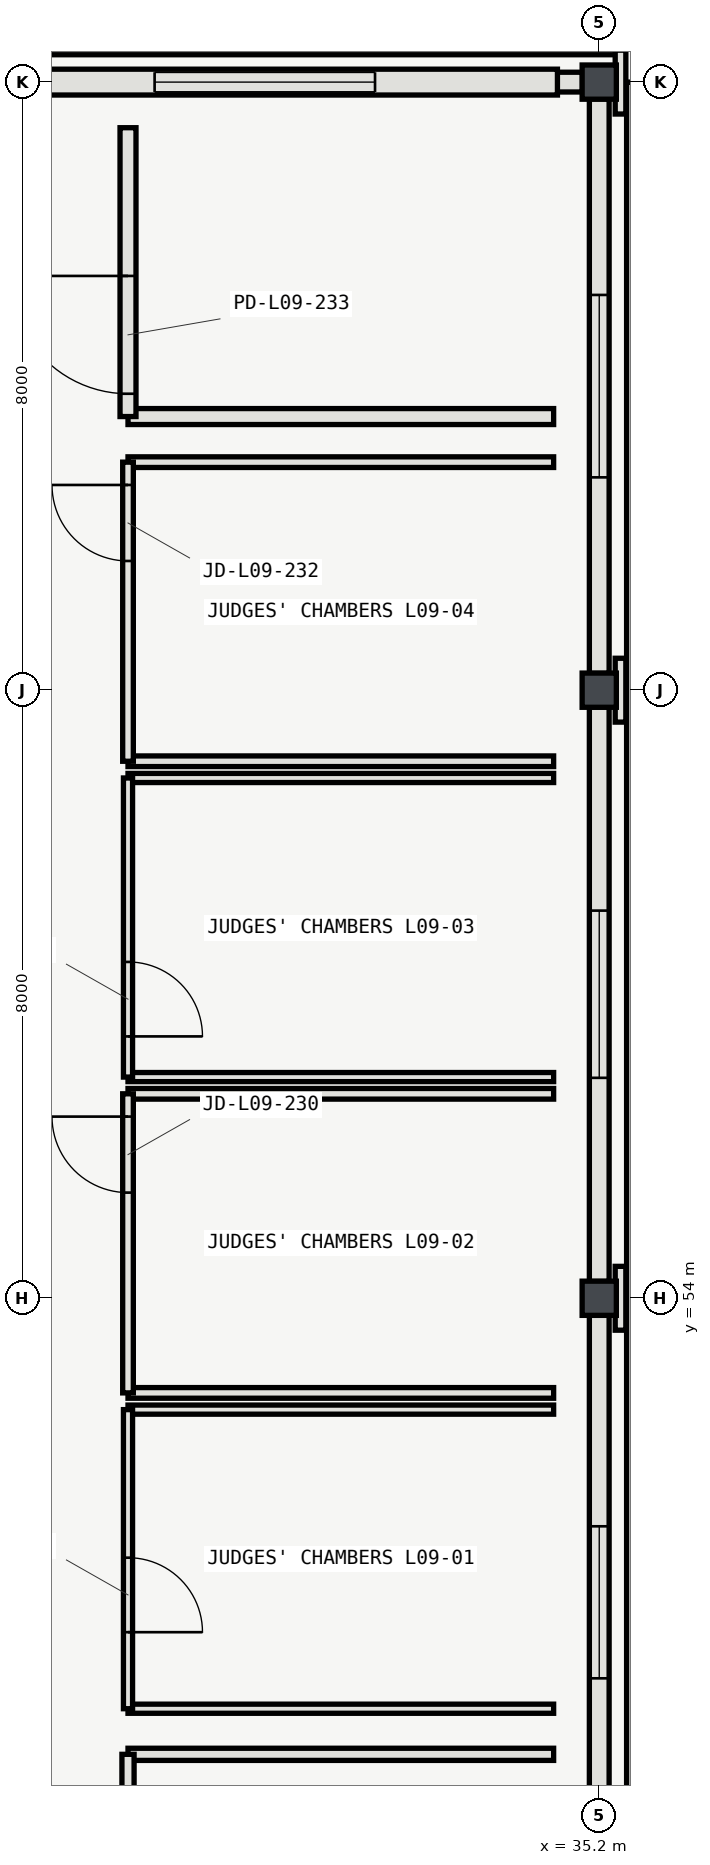
"""IFC4 building model, lengths in metres.
Left out: names, types, materials, properties, quantities, classifications, styles, units other than length and angle.
Written with IfcOpenShell. Run it as: python <this file> out.ifc"""

import sys

from ifc_helpers import new_model, si_unit, direction, frame, frame_2d, origin, origin_2d, place, context, subcontext, project, spatial, polyline, rectangle, hollow_rectangle, outline, extrude, element, fill, save


model = new_model("IFC4")
c1 = context("Model", 3, precision=1e-05, world=origin(), true_north=direction((0.0, 1.0)))
c2 = subcontext(c1, "Body", "Model", "MODEL_VIEW")
j1 = project(units=[si_unit("LENGTHUNIT", "METRE"), si_unit("PLANEANGLEUNIT", "RADIAN")], contexts=[c1])
p1 = place(None, origin())
s1 = spatial("IfcSite", under=j1, at=p1, CompositionType="ELEMENT")
p2 = place(p1, origin())
s2 = spatial("IfcBuilding", under=s1, at=p2, CompositionType="ELEMENT")
p3 = place(p2, frame((0.0, 0.0, 41.4)))
s3 = spatial("IfcBuildingStorey", under=s2, at=p3, CompositionType="ELEMENT", Elevation=41.4)
for number, where, z_axis, x_axis in (
    (1, (35.2, 54.0, 0.0), (0.0, 0.0, 1.0), (1.0, 0.0, 0.0)),
    (2, (35.2, 62.0, 0.0), (0.0, 0.0, 1.0), (1.0, 0.0, 0.0)),
    (3, (35.2, 70.0, 0.0), (0.0, 0.0, 1.0), (1.0, 0.0, 0.0)),
):
    element("IfcColumn", number, at=place(p3, frame(where, z_axis=z_axis, x_axis=x_axis)), inside=s3, PredefinedType="COLUMN", context=c2, shape_type="SweptSolid", body=[
        extrude(hollow_rectangle(XDim=0.45, YDim=0.45, WallThickness=0.018, InnerFilletRadius=0.018, OuterFilletRadius=0.036, at=origin_2d()), origin(), (0.0, 0.0, 1.0), 4.2),
    ])
p4 = place(p3, frame((34.979, 70.0, 0.0), z_axis=(0.0, 0.0, 1.0), x_axis=(-1.0, 0.0, 0.0)))
e4 = element("IfcWall", 4, at=p4, inside=s3, PredefinedType="SOLIDWALL", context=c2, shape_type="SweptSolid", body=[
    extrude(rectangle(XDim=8.283, YDim=0.26, at=frame_2d((4.142, 0.0))), origin(), (0.0, 0.0, 1.0), 3.473),
])
p5 = place(p4, frame((2.729, 0.0, 0.95)))
e5 = element("IfcOpeningElement", 5, at=p5, cuts=e4, PredefinedType="OPENING", context=c2, shape_type="SweptSolid", body=[
    extrude(rectangle(XDim=2.9, YDim=1.95, at=frame_2d((1.45, 0.975))), frame((0.0, 0.14, 0.0), z_axis=(0.0, -1.0, 0.0), x_axis=(1.0, 0.0, 0.0)), (0.0, 0.0, 1.0), 0.28),
])
p6 = place(p3, frame((35.2, 46.221, 0.0), z_axis=(0.0, 0.0, 1.0), x_axis=(0.0, 1.0, 0.0)))
e6 = element("IfcWall", 6, at=p6, inside=s3, PredefinedType="SOLIDWALL", context=c2, shape_type="SweptSolid", body=[
    extrude(rectangle(XDim=7.558, YDim=0.26, at=frame_2d((3.779, 0.0))), origin(), (0.0, 0.0, 1.0), 3.473),
])
p7 = place(p6, frame((2.779, 0.0, 0.95)))
e7 = element("IfcOpeningElement", 7, at=p7, cuts=e6, PredefinedType="OPENING", context=c2, shape_type="SweptSolid", body=[
    extrude(rectangle(XDim=2.0, YDim=1.8, at=frame_2d((1.0, 0.9))), frame((0.0, 0.14, 0.0), z_axis=(0.0, -1.0, 0.0), x_axis=(1.0, 0.0, 0.0)), (0.0, 0.0, 1.0), 0.28),
])
p8 = place(p3, frame((35.2, 54.221, 0.0), z_axis=(0.0, 0.0, 1.0), x_axis=(0.0, 1.0, 0.0)))
e8 = element("IfcWall", 8, at=p8, inside=s3, PredefinedType="SOLIDWALL", context=c2, shape_type="SweptSolid", body=[
    extrude(rectangle(XDim=7.558, YDim=0.26, at=frame_2d((3.779, 0.0))), origin(), (0.0, 0.0, 1.0), 3.473),
])
p9 = place(p8, frame((2.679, 0.0, 0.95)))
e9 = element("IfcOpeningElement", 9, at=p9, cuts=e8, PredefinedType="OPENING", context=c2, shape_type="SweptSolid", body=[
    extrude(rectangle(XDim=2.2, YDim=1.8, at=frame_2d((1.1, 0.9))), frame((0.0, 0.14, 0.0), z_axis=(0.0, -1.0, 0.0), x_axis=(1.0, 0.0, 0.0)), (0.0, 0.0, 1.0), 0.28),
])
p10 = place(p3, frame((35.2, 62.221, 0.0), z_axis=(0.0, 0.0, 1.0), x_axis=(0.0, 1.0, 0.0)))
e10 = element("IfcWall", 10, at=p10, inside=s3, PredefinedType="SOLIDWALL", context=c2, shape_type="SweptSolid", body=[
    extrude(rectangle(XDim=7.558, YDim=0.26, at=frame_2d((3.779, 0.0))), origin(), (0.0, 0.0, 1.0), 3.473),
])
p11 = place(p10, frame((2.579, 0.0, 0.95)))
e11 = element("IfcOpeningElement", 11, at=p11, cuts=e10, PredefinedType="OPENING", context=c2, shape_type="SweptSolid", body=[
    extrude(rectangle(XDim=2.4, YDim=1.8, at=frame_2d((1.2, 0.9))), frame((0.0, 0.14, 0.0), z_axis=(0.0, -1.0, 0.0), x_axis=(1.0, 0.0, 0.0)), (0.0, 0.0, 1.0), 0.28),
])
p12 = place(p3, frame((34.65, 70.0, 4.42), z_axis=(0.0, 0.0, 1.0), x_axis=(-1.0, 0.0, 0.0)))
e12 = element("IfcWall", 12, at=p12, inside=s3, PredefinedType="SOLIDWALL", context=c2, shape_type="SweptSolid", body=[
    extrude(outline(polyline([(0.0, 0.0), (34.1, 0.0), (34.1, 0.2), (22.087, 3.0), (0.0, 0.2), (0.0, 0.0)])), frame((0.0, 0.17, 0.0), z_axis=(0.0, -1.0, 0.0), x_axis=(1.0, 0.0, 0.0)), (0.0, 0.0, 1.0), 0.34),
])
p13 = place(p12, frame((21.087, 0.0, 0.55)))
e13 = element("IfcOpeningElement", 13, at=p13, cuts=e12, PredefinedType="OPENING", context=c2, shape_type="SweptSolid", body=[
    extrude(outline(polyline([(2.0, 1.0), (1.985, 1.174), (1.94, 1.342), (1.866, 1.5), (1.766, 1.643), (1.643, 1.766), (1.5, 1.866), (1.342, 1.94), (1.174, 1.985), (1.0, 2.0), (0.826, 1.985), (0.658, 1.94), (0.5, 1.866), (0.357, 1.766), (0.234, 1.643), (0.134, 1.5), (0.06, 1.342), (0.015, 1.174), (0.0, 1.0), (0.015, 0.826), (0.06, 0.658), (0.134, 0.5), (0.234, 0.357), (0.357, 0.234), (0.5, 0.134), (0.658, 0.06), (0.826, 0.015), (1.0, 0.0), (1.174, 0.015), (1.342, 0.06), (1.5, 0.134), (1.643, 0.234), (1.766, 0.357), (1.866, 0.5), (1.94, 0.658), (1.985, 0.826), (2.0, 1.0)])), frame((0.0, 0.18, 0.0), z_axis=(0.0, -1.0, 0.0), x_axis=(1.0, 0.0, 0.0)), (0.0, 0.0, 1.0), 0.36),
])
p14 = place(p3, frame((35.64, 38.0, 0.0), z_axis=(0.0, 0.0, 1.0), x_axis=(0.0, 1.0, 0.0)))
e14 = element("IfcWall", 14, at=p14, inside=s3, PredefinedType="SOLIDWALL", context=c2, shape_type="SweptSolid", body=[
    extrude(rectangle(XDim=32.0, YDim=0.16, at=frame_2d((16.0, 0.0))), origin(), (0.0, 0.0, 1.0), 0.58),
])
p15 = place(p3, frame((35.54, 70.44, 0.0), z_axis=(0.0, 0.0, 1.0), x_axis=(-1.0, 0.0, 0.0)))
e15 = element("IfcWall", 15, at=p15, inside=s3, PredefinedType="SOLIDWALL", context=c2, shape_type="SweptSolid", body=[
    extrude(rectangle(XDim=35.88, YDim=0.16, at=frame_2d((17.94, 0.0))), origin(), (0.0, 0.0, 1.0), 0.58),
])
for number, where, z_axis, x_axis in (
    (16, (35.48, 53.58, 0.0), (0.0, 0.0, 1.0), (0.0, 1.0, 0.0)),
    (17, (35.48, 61.58, 0.0), (0.0, 0.0, 1.0), (0.0, 1.0, 0.0)),
    (18, (35.48, 69.58, 0.0), (0.0, 0.0, 1.0), (0.0, 1.0, 0.0)),
):
    element("IfcWall", number, at=place(p3, frame(where, z_axis=z_axis, x_axis=x_axis)), inside=s3, PredefinedType="SOLIDWALL", context=c2, shape_type="SweptSolid", body=[
        extrude(rectangle(XDim=0.84, YDim=0.14, at=frame_2d((0.42, 0.0))), origin(), (0.0, 0.0, 1.0), 3.94),
    ])
p16 = place(p3, frame((34.6, 48.0, 0.0), z_axis=(0.0, 0.0, 1.0), x_axis=(-1.0, 0.0, 0.0)))
e19 = element("IfcWall", 19, at=p16, inside=s3, PredefinedType="PARTITIONING", context=c2, shape_type="SweptSolid", body=[
    extrude(rectangle(XDim=5.6, YDim=0.16, at=frame_2d((2.8, 0.0))), origin(), (0.0, 0.0, 1.0), 3.92),
])
p17 = place(p3, frame((29.0, 48.0, 0.0), z_axis=(0.0, 0.0, 1.0), x_axis=(0.0, -1.0, 0.0)))
e20 = element("IfcWall", 20, at=p17, inside=s3, PredefinedType="PARTITIONING", context=c2, shape_type="SweptSolid", body=[
    extrude(rectangle(XDim=9.4, YDim=0.16, at=frame_2d((4.7, 0.0))), origin(), (0.0, 0.0, 1.0), 3.92),
])
p18 = place(p17, frame((5.634, 0.0, 0.0)))
e21 = element("IfcOpeningElement", 21, at=p18, cuts=e20, PredefinedType="OPENING", context=c2, shape_type="SweptSolid", body=[
    extrude(rectangle(XDim=1.18, YDim=2.2, at=frame_2d((0.59, 1.1))), frame((0.0, 0.09, 0.0), z_axis=(0.0, -1.0, 0.0), x_axis=(1.0, 0.0, 0.0)), (0.0, 0.0, 1.0), 0.18),
])
for number, where, z_axis, x_axis in (
    (22, (29.0, 48.6, 0.0), (0.0, 0.0, 1.0), (1.0, 0.0, 0.0)),
    (23, (34.6, 52.535, 0.0), (0.0, 0.0, 1.0), (-1.0, 0.0, 0.0)),
):
    element("IfcWall", number, at=place(p3, frame(where, z_axis=z_axis, x_axis=x_axis)), inside=s3, PredefinedType="PARTITIONING", context=c2, shape_type="SweptSolid", body=[
        extrude(rectangle(XDim=5.6, YDim=0.12, at=frame_2d((2.8, 0.0))), origin(), (0.0, 0.0, 1.0), 3.92),
    ])
p19 = place(p3, frame((29.0, 52.535, 0.0), z_axis=(0.0, 0.0, 1.0), x_axis=(0.0, -1.0, 0.0)))
e24 = element("IfcWall", 24, at=p19, inside=s3, PredefinedType="PARTITIONING", context=c2, shape_type="SweptSolid", body=[
    extrude(rectangle(XDim=3.935, YDim=0.12, at=frame_2d((1.967, 0.0))), origin(), (0.0, 0.0, 1.0), 3.92),
])
p20 = place(p19, frame((1.948, 0.0, 0.0)))
e25 = element("IfcOpeningElement", 25, at=p20, cuts=e24, PredefinedType="OPENING", context=c2, shape_type="SweptSolid", body=[
    extrude(rectangle(XDim=0.98, YDim=2.2, at=frame_2d((0.49, 1.1))), frame((0.0, 0.07, 0.0), z_axis=(0.0, -1.0, 0.0), x_axis=(1.0, 0.0, 0.0)), (0.0, 0.0, 1.0), 0.14),
])
for number, where, z_axis, x_axis in (
    (26, (29.0, 52.755, 0.0), (0.0, 0.0, 1.0), (1.0, 0.0, 0.0)),
    (27, (34.6, 56.69, 0.0), (0.0, 0.0, 1.0), (-1.0, 0.0, 0.0)),
):
    element("IfcWall", number, at=place(p3, frame(where, z_axis=z_axis, x_axis=x_axis)), inside=s3, PredefinedType="PARTITIONING", context=c2, shape_type="SweptSolid", body=[
        extrude(rectangle(XDim=5.6, YDim=0.14, at=frame_2d((2.8, 0.0))), origin(), (0.0, 0.0, 1.0), 3.92),
    ])
p21 = place(p3, frame((29.0, 56.69, 0.0), z_axis=(0.0, 0.0, 1.0), x_axis=(0.0, -1.0, 0.0)))
e28 = element("IfcWall", 28, at=p21, inside=s3, PredefinedType="PARTITIONING", context=c2, shape_type="SweptSolid", body=[
    extrude(rectangle(XDim=3.935, YDim=0.14, at=frame_2d((1.968, 0.0))), origin(), (0.0, 0.0, 1.0), 3.92),
])
p22 = place(p21, frame((0.3, 0.0, 0.0)))
e29 = element("IfcOpeningElement", 29, at=p22, cuts=e28, PredefinedType="OPENING", context=c2, shape_type="SweptSolid", body=[
    extrude(rectangle(XDim=1.0, YDim=2.15, at=frame_2d((0.5, 1.075))), frame((0.0, 0.08, 0.0), z_axis=(0.0, -1.0, 0.0), x_axis=(1.0, 0.0, 0.0)), (0.0, 0.0, 1.0), 0.16),
])
for number, where, z_axis, x_axis in (
    (30, (29.0, 56.91, 0.0), (0.0, 0.0, 1.0), (1.0, 0.0, 0.0)),
    (31, (34.6, 60.845, 0.0), (0.0, 0.0, 1.0), (-1.0, 0.0, 0.0)),
):
    element("IfcWall", number, at=place(p3, frame(where, z_axis=z_axis, x_axis=x_axis)), inside=s3, PredefinedType="PARTITIONING", context=c2, shape_type="SweptSolid", body=[
        extrude(rectangle(XDim=5.6, YDim=0.12, at=frame_2d((2.8, 0.0))), origin(), (0.0, 0.0, 1.0), 3.92),
    ])
p23 = place(p3, frame((29.0, 60.845, 0.0), z_axis=(0.0, 0.0, 1.0), x_axis=(0.0, -1.0, 0.0)))
e32 = element("IfcWall", 32, at=p23, inside=s3, PredefinedType="PARTITIONING", context=c2, shape_type="SweptSolid", body=[
    extrude(rectangle(XDim=3.935, YDim=0.12, at=frame_2d((1.968, 0.0))), origin(), (0.0, 0.0, 1.0), 3.92),
])
p24 = place(p23, frame((2.42, 0.0, 0.0)))
e33 = element("IfcOpeningElement", 33, at=p24, cuts=e32, PredefinedType="OPENING", context=c2, shape_type="SweptSolid", body=[
    extrude(rectangle(XDim=0.98, YDim=2.15, at=frame_2d((0.49, 1.075))), frame((0.0, 0.07, 0.0), z_axis=(0.0, -1.0, 0.0), x_axis=(1.0, 0.0, 0.0)), (0.0, 0.0, 1.0), 0.14),
])
for number, where, z_axis, x_axis in (
    (34, (29.0, 61.065, 0.0), (0.0, 0.0, 1.0), (1.0, 0.0, 0.0)),
    (35, (34.6, 65.0, 0.0), (0.0, 0.0, 1.0), (-1.0, 0.0, 0.0)),
):
    element("IfcWall", number, at=place(p3, frame(where, z_axis=z_axis, x_axis=x_axis)), inside=s3, PredefinedType="PARTITIONING", context=c2, shape_type="SweptSolid", body=[
        extrude(rectangle(XDim=5.6, YDim=0.14, at=frame_2d((2.8, 0.0))), origin(), (0.0, 0.0, 1.0), 3.92),
    ])
p25 = place(p3, frame((29.0, 65.0, 0.0), z_axis=(0.0, 0.0, 1.0), x_axis=(0.0, -1.0, 0.0)))
e36 = element("IfcWall", 36, at=p25, inside=s3, PredefinedType="PARTITIONING", context=c2, shape_type="SweptSolid", body=[
    extrude(rectangle(XDim=3.935, YDim=0.14, at=frame_2d((1.968, 0.0))), origin(), (0.0, 0.0, 1.0), 3.92),
])
p26 = place(p25, frame((0.3, 0.0, 0.0)))
e37 = element("IfcOpeningElement", 37, at=p26, cuts=e36, PredefinedType="OPENING", context=c2, shape_type="SweptSolid", body=[
    extrude(rectangle(XDim=1.0, YDim=2.2, at=frame_2d((0.5, 1.1))), frame((0.0, 0.08, 0.0), z_axis=(0.0, -1.0, 0.0), x_axis=(1.0, 0.0, 0.0)), (0.0, 0.0, 1.0), 0.16),
])
p27 = place(p3, frame((29.0, 65.6, 0.0), z_axis=(0.0, 0.0, 1.0), x_axis=(1.0, 0.0, 0.0)))
e38 = element("IfcWall", 38, at=p27, inside=s3, PredefinedType="PARTITIONING", context=c2, shape_type="SweptSolid", body=[
    extrude(rectangle(XDim=5.6, YDim=0.21, at=frame_2d((2.8, 0.0))), origin(), (0.0, 0.0, 1.0), 3.92),
])
p28 = place(p3, frame((29.0, 69.4, 0.0), z_axis=(0.0, 0.0, 1.0), x_axis=(0.0, -1.0, 0.0)))
e39 = element("IfcWall", 39, at=p28, inside=s3, PredefinedType="PARTITIONING", context=c2, shape_type="SweptSolid", body=[
    extrude(rectangle(XDim=3.8, YDim=0.21, at=frame_2d((1.9, 0.0))), origin(), (0.0, 0.0, 1.0), 3.92),
])
p29 = place(p28, frame((1.95, 0.0, 0.0)))
e40 = element("IfcOpeningElement", 40, at=p29, cuts=e39, PredefinedType="OPENING", context=c2, shape_type="SweptSolid", body=[
    extrude(rectangle(XDim=1.55, YDim=2.25, at=frame_2d((0.775, 1.125))), frame((0.0, 0.115, 0.0), z_axis=(0.0, -1.0, 0.0), x_axis=(1.0, 0.0, 0.0)), (0.0, 0.0, 1.0), 0.23),
])
p30 = place(p5, origin())
e41 = element("IfcWindow", 41, at=p30, inside=s3, PartitioningType="SINGLE_PANEL", PredefinedType="WINDOW", context=c2, shape_type="SweptSolid", body=[
    extrude(rectangle(XDim=2.9, YDim=1.95, at=frame_2d((1.45, 0.975))), frame((0.0, 0.03, 0.0), z_axis=(0.0, -1.0, 0.0), x_axis=(1.0, 0.0, 0.0)), (0.0, 0.0, 1.0), 0.06),
])
fill(e5, e41)
p31 = place(p7, origin())
e42 = element("IfcWindow", 42, at=p31, inside=s3, PartitioningType="SINGLE_PANEL", PredefinedType="WINDOW", context=c2, shape_type="SweptSolid", body=[
    extrude(rectangle(XDim=2.0, YDim=1.8, at=frame_2d((1.0, 0.9))), frame((0.0, 0.03, 0.0), z_axis=(0.0, -1.0, 0.0), x_axis=(1.0, 0.0, 0.0)), (0.0, 0.0, 1.0), 0.06),
])
fill(e7, e42)
p32 = place(p9, origin())
e43 = element("IfcWindow", 43, at=p32, inside=s3, PartitioningType="SINGLE_PANEL", PredefinedType="WINDOW", context=c2, shape_type="SweptSolid", body=[
    extrude(rectangle(XDim=2.2, YDim=1.8, at=frame_2d((1.1, 0.9))), frame((0.0, 0.03, 0.0), z_axis=(0.0, -1.0, 0.0), x_axis=(1.0, 0.0, 0.0)), (0.0, 0.0, 1.0), 0.06),
])
fill(e9, e43)
p33 = place(p11, origin())
e44 = element("IfcWindow", 44, at=p33, inside=s3, PartitioningType="SINGLE_PANEL", PredefinedType="WINDOW", context=c2, shape_type="SweptSolid", body=[
    extrude(rectangle(XDim=2.4, YDim=1.8, at=frame_2d((1.2, 0.9))), frame((0.0, 0.03, 0.0), z_axis=(0.0, -1.0, 0.0), x_axis=(1.0, 0.0, 0.0)), (0.0, 0.0, 1.0), 0.06),
])
fill(e11, e44)
p34 = place(p20, origin())
e45 = element("IfcDoor", 45, at=p34, inside=s3, OperationType="SINGLE_SWING_RIGHT", PredefinedType="DOOR", context=c2, shape_type="SweptSolid", body=[
    extrude(rectangle(XDim=0.98, YDim=2.2, at=frame_2d((0.49, 1.1))), frame((0.0, 0.025, 0.0), z_axis=(0.0, -1.0, 0.0), x_axis=(1.0, 0.0, 0.0)), (0.0, 0.0, 1.0), 0.05),
])
fill(e25, e45)
p35 = place(p22, origin())
e46 = element("IfcDoor", 46, at=p35, inside=s3, OperationType="SINGLE_SWING_LEFT", PredefinedType="DOOR", context=c2, shape_type="SweptSolid", body=[
    extrude(rectangle(XDim=1.0, YDim=2.15, at=frame_2d((0.5, 1.075))), frame((0.0, 0.025, 0.0), z_axis=(0.0, -1.0, 0.0), x_axis=(1.0, 0.0, 0.0)), (0.0, 0.0, 1.0), 0.05),
])
fill(e29, e46)
p36 = place(p24, origin())
e47 = element("IfcDoor", 47, at=p36, inside=s3, OperationType="SINGLE_SWING_RIGHT", PredefinedType="DOOR", context=c2, shape_type="SweptSolid", body=[
    extrude(rectangle(XDim=0.98, YDim=2.15, at=frame_2d((0.49, 1.075))), frame((0.0, 0.025, 0.0), z_axis=(0.0, -1.0, 0.0), x_axis=(1.0, 0.0, 0.0)), (0.0, 0.0, 1.0), 0.05),
])
fill(e33, e47)
p37 = place(p26, origin())
e48 = element("IfcDoor", 48, at=p37, inside=s3, OperationType="SINGLE_SWING_LEFT", PredefinedType="DOOR", context=c2, shape_type="SweptSolid", body=[
    extrude(rectangle(XDim=1.0, YDim=2.2, at=frame_2d((0.5, 1.1))), frame((0.0, 0.025, 0.0), z_axis=(0.0, -1.0, 0.0), x_axis=(1.0, 0.0, 0.0)), (0.0, 0.0, 1.0), 0.05),
])
fill(e37, e48)
p38 = place(p29, origin())
e49 = element("IfcDoor", 49, at=p38, inside=s3, OperationType="DOUBLE_DOOR_SINGLE_SWING", PredefinedType="DOOR", context=c2, shape_type="SweptSolid", body=[
    extrude(rectangle(XDim=1.55, YDim=2.25, at=frame_2d((0.775, 1.125))), frame((0.0, 0.025, 0.0), z_axis=(0.0, -1.0, 0.0), x_axis=(1.0, 0.0, 0.0)), (0.0, 0.0, 1.0), 0.05),
])
fill(e40, e49)
save(model, sys.argv[1])
